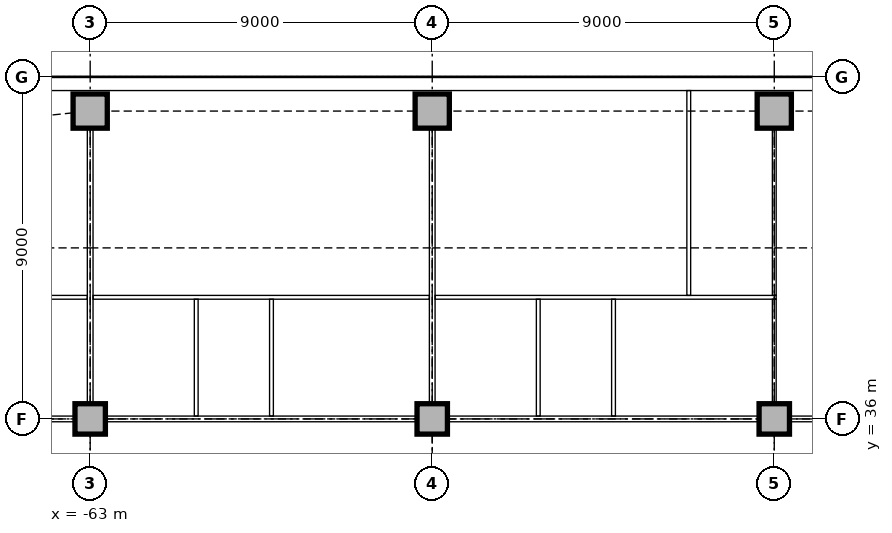
"""IFC4 building model, lengths in metres.
Left out: names, types, materials, properties, quantities, classifications, styles, units other than length and angle.
Written with IfcOpenShell. Run it as: python <this file> out.ifc"""

import sys

from ifc_helpers import new_model, si_unit, direction, frame, frame_2d, origin, origin_2d, place, context, subcontext, project, spatial, rectangle, extrude, element, fill, save


model = new_model("IFC4")
c1 = context("Model", 3, precision=1e-05, world=origin(), true_north=direction((0.0, 1.0)))
c2 = subcontext(c1, "Body", "Model", "MODEL_VIEW")
j1 = project(units=[si_unit("LENGTHUNIT", "METRE"), si_unit("PLANEANGLEUNIT", "RADIAN")], contexts=[c1])
p1 = place(None, origin())
s1 = spatial("IfcSite", under=j1, at=p1, CompositionType="ELEMENT")
p2 = place(p1, origin())
s2 = spatial("IfcBuilding", under=s1, at=p2, CompositionType="ELEMENT")
p3 = place(p2, frame((0.0, 0.0, 26.0)))
s3 = spatial("IfcBuildingStorey", under=s2, at=p3, CompositionType="ELEMENT", Elevation=26.0)
for number, where, z_axis, x_axis in (
    (1, (-63.0, 44.1, 0.0), (0.0, 0.0, 1.0), (1.0, 0.0, 0.0)),
    (2, (-54.0, 44.1, 0.0), (0.0, 0.0, 1.0), (1.0, 0.0, 0.0)),
    (3, (-45.0, 44.1, 0.0), (0.0, 0.0, 1.0), (1.0, 0.0, 0.0)),
):
    element("IfcColumn", number, at=place(p3, frame(where, z_axis=z_axis, x_axis=x_axis)), inside=s3, PredefinedType="COLUMN", context=c2, shape_type="SweptSolid", body=[
        extrude(rectangle(XDim=0.9, YDim=0.9, at=origin_2d()), origin(), (0.0, 0.0, 1.0), 3.85),
    ])
for number, where, z_axis, x_axis in (
    (4, (-63.0, 36.0, 0.0), (0.0, 0.0, 1.0), (1.0, 0.0, 0.0)),
    (5, (-54.0, 36.0, 0.0), (0.0, 0.0, 1.0), (1.0, 0.0, 0.0)),
    (6, (-45.0, 36.0, 0.0), (0.0, 0.0, 1.0), (1.0, 0.0, 0.0)),
):
    element("IfcColumn", number, at=place(p3, frame(where, z_axis=z_axis, x_axis=x_axis)), inside=s3, PredefinedType="COLUMN", context=c2, shape_type="SweptSolid", body=[
        extrude(rectangle(XDim=0.8, YDim=0.8, at=origin_2d()), origin(), (0.0, 0.0, 1.0), 3.85),
    ])
p4 = place(p3, frame((-31.243, 44.82, 0.0), z_axis=(0.0, 0.0, 1.0), x_axis=(-1.0, 0.0, 0.0)))
e7 = element("IfcWall", 7, at=p4, inside=s3, PredefinedType="STANDARD", context=c2, shape_type="SweptSolid", body=[
    extrude(rectangle(XDim=36.515, YDim=0.36, at=frame_2d((18.257, 0.0))), origin(), (0.0, 0.0, 1.0), 3.85),
])
p5 = place(p4, frame((3.107, 0.0, 0.9)))
e8 = element("IfcOpeningElement", 8, at=p5, cuts=e7, PredefinedType="OPENING", context=c2, shape_type="SweptSolid", body=[
    extrude(rectangle(XDim=3.3, YDim=1.6, at=frame_2d((1.65, 0.8))), frame((0.0, 0.19, 0.0), z_axis=(0.0, -1.0, 0.0), x_axis=(1.0, 0.0, 0.0)), (0.0, 0.0, 1.0), 0.38),
])
p6 = place(p4, frame((7.607, 0.0, 0.9)))
e9 = element("IfcOpeningElement", 9, at=p6, cuts=e7, PredefinedType="OPENING", context=c2, shape_type="SweptSolid", body=[
    extrude(rectangle(XDim=3.3, YDim=1.6, at=frame_2d((1.65, 0.8))), frame((0.0, 0.19, 0.0), z_axis=(0.0, -1.0, 0.0), x_axis=(1.0, 0.0, 0.0)), (0.0, 0.0, 1.0), 0.38),
])
p7 = place(p4, frame((12.107, 0.0, 0.9)))
e10 = element("IfcOpeningElement", 10, at=p7, cuts=e7, PredefinedType="OPENING", context=c2, shape_type="SweptSolid", body=[
    extrude(rectangle(XDim=3.3, YDim=1.6, at=frame_2d((1.65, 0.8))), frame((0.0, 0.19, 0.0), z_axis=(0.0, -1.0, 0.0), x_axis=(1.0, 0.0, 0.0)), (0.0, 0.0, 1.0), 0.38),
])
p8 = place(p4, frame((16.607, 0.0, 0.9)))
e11 = element("IfcOpeningElement", 11, at=p8, cuts=e7, PredefinedType="OPENING", context=c2, shape_type="SweptSolid", body=[
    extrude(rectangle(XDim=3.3, YDim=1.6, at=frame_2d((1.65, 0.8))), frame((0.0, 0.19, 0.0), z_axis=(0.0, -1.0, 0.0), x_axis=(1.0, 0.0, 0.0)), (0.0, 0.0, 1.0), 0.38),
])
p9 = place(p4, frame((21.107, 0.0, 0.9)))
e12 = element("IfcOpeningElement", 12, at=p9, cuts=e7, PredefinedType="OPENING", context=c2, shape_type="SweptSolid", body=[
    extrude(rectangle(XDim=3.3, YDim=1.6, at=frame_2d((1.65, 0.8))), frame((0.0, 0.19, 0.0), z_axis=(0.0, -1.0, 0.0), x_axis=(1.0, 0.0, 0.0)), (0.0, 0.0, 1.0), 0.38),
])
p10 = place(p4, frame((25.607, 0.0, 0.9)))
e13 = element("IfcOpeningElement", 13, at=p10, cuts=e7, PredefinedType="OPENING", context=c2, shape_type="SweptSolid", body=[
    extrude(rectangle(XDim=3.3, YDim=1.6, at=frame_2d((1.65, 0.8))), frame((0.0, 0.19, 0.0), z_axis=(0.0, -1.0, 0.0), x_axis=(1.0, 0.0, 0.0)), (0.0, 0.0, 1.0), 0.38),
])
p11 = place(p4, frame((30.107, 0.0, 0.9)))
e14 = element("IfcOpeningElement", 14, at=p11, cuts=e7, PredefinedType="OPENING", context=c2, shape_type="SweptSolid", body=[
    extrude(rectangle(XDim=3.3, YDim=1.6, at=frame_2d((1.65, 0.8))), frame((0.0, 0.19, 0.0), z_axis=(0.0, -1.0, 0.0), x_axis=(1.0, 0.0, 0.0)), (0.0, 0.0, 1.0), 0.38),
])
p12 = place(p3, frame((-44.6, 36.0, 0.0), z_axis=(0.0, 0.0, 1.0), x_axis=(1.0, 0.0, 0.0)))
e15 = element("IfcWall", 15, at=p12, inside=s3, PredefinedType="PARTITIONING", context=c2, shape_type="SweptSolid", body=[
    extrude(rectangle(XDim=1.875, YDim=0.15, at=frame_2d((0.938, 0.0))), origin(), (0.0, 0.0, 1.0), 3.602),
])
p13 = place(p12, frame((0.5, 0.0, 0.0)))
e16 = element("IfcOpeningElement", 16, at=p13, cuts=e15, PredefinedType="OPENING", context=c2, shape_type="SweptSolid", body=[
    extrude(rectangle(XDim=0.9, YDim=2.1, at=frame_2d((0.45, 1.05))), frame((0.0, 0.085, 0.0), z_axis=(0.0, -1.0, 0.0), x_axis=(1.0, 0.0, 0.0)), (0.0, 0.0, 1.0), 0.17),
])
p14 = place(p3, frame((-53.6, 36.0, 0.0), z_axis=(0.0, 0.0, 1.0), x_axis=(1.0, 0.0, 0.0)))
e17 = element("IfcWall", 17, at=p14, inside=s3, PredefinedType="PARTITIONING", context=c2, shape_type="SweptSolid", body=[
    extrude(rectangle(XDim=8.2, YDim=0.15, at=frame_2d((4.1, 0.0))), origin(), (0.0, 0.0, 1.0), 3.15),
])
p15 = place(p14, frame((2.89, 0.0, 0.0)))
e18 = element("IfcOpeningElement", 18, at=p15, cuts=e17, PredefinedType="OPENING", context=c2, shape_type="SweptSolid", body=[
    extrude(rectangle(XDim=1.0, YDim=2.1, at=frame_2d((0.5, 1.05))), frame((0.0, 0.085, 0.0), z_axis=(0.0, -1.0, 0.0), x_axis=(1.0, 0.0, 0.0)), (0.0, 0.0, 1.0), 0.17),
])
p16 = place(p3, frame((-62.6, 36.0, 0.0), z_axis=(0.0, 0.0, 1.0), x_axis=(1.0, 0.0, 0.0)))
e19 = element("IfcWall", 19, at=p16, inside=s3, PredefinedType="PARTITIONING", context=c2, shape_type="SweptSolid", body=[
    extrude(rectangle(XDim=8.2, YDim=0.15, at=frame_2d((4.1, 0.0))), origin(), (0.0, 0.0, 1.0), 3.15),
])
p17 = place(p16, frame((2.89, 0.0, 0.0)))
e20 = element("IfcOpeningElement", 20, at=p17, cuts=e19, PredefinedType="OPENING", context=c2, shape_type="SweptSolid", body=[
    extrude(rectangle(XDim=1.0, YDim=2.1, at=frame_2d((0.5, 1.05))), frame((0.0, 0.085, 0.0), z_axis=(0.0, -1.0, 0.0), x_axis=(1.0, 0.0, 0.0)), (0.0, 0.0, 1.0), 0.17),
])
p18 = place(p3, frame((-70.65, 36.0, 0.0), z_axis=(0.0, 0.0, 1.0), x_axis=(1.0, 0.0, 0.0)))
e21 = element("IfcWall", 21, at=p18, inside=s3, PredefinedType="PARTITIONING", context=c2, shape_type="SweptSolid", body=[
    extrude(rectangle(XDim=7.25, YDim=0.15, at=frame_2d((3.625, 0.0))), origin(), (0.0, 0.0, 1.0), 3.15),
])
p19 = place(p18, frame((2.138, 0.0, 0.0)))
e22 = element("IfcOpeningElement", 22, at=p19, cuts=e21, PredefinedType="OPENING", context=c2, shape_type="SweptSolid", body=[
    extrude(rectangle(XDim=1.0, YDim=2.1, at=frame_2d((0.5, 1.05))), frame((0.0, 0.085, 0.0), z_axis=(0.0, -1.0, 0.0), x_axis=(1.0, 0.0, 0.0)), (0.0, 0.0, 1.0), 0.17),
])
for number, where, z_axis, x_axis in (
    (23, (-63.0, 36.4, 0.0), (0.0, 0.0, 1.0), (0.0, 1.0, 0.0)),
    (24, (-54.0, 36.4, 0.0), (0.0, 0.0, 1.0), (0.0, 1.0, 0.0)),
):
    element("IfcWall", number, at=place(p3, frame(where, z_axis=z_axis, x_axis=x_axis)), inside=s3, PredefinedType="PARTITIONING", context=c2, shape_type="SweptSolid", body=[
        extrude(rectangle(XDim=7.25, YDim=0.15, at=frame_2d((3.625, 0.0))), origin(), (0.0, 0.0, 1.0), 3.158),
    ])
p20 = place(p3, frame((-53.925, 39.2, 0.0), z_axis=(0.0, 0.0, 1.0), x_axis=(1.0, 0.0, 0.0)))
e25 = element("IfcWall", 25, at=p20, inside=s3, PredefinedType="PARTITIONING", context=c2, shape_type="SweptSolid", body=[
    extrude(rectangle(XDim=8.975, YDim=0.1, at=frame_2d((4.487, 0.0))), origin(), (0.0, 0.0, 1.0), 3.85),
])
p21 = place(p20, frame((3.265, 0.0, 0.0)))
e26 = element("IfcOpeningElement", 26, at=p21, cuts=e25, PredefinedType="OPENING", context=c2, shape_type="SweptSolid", body=[
    extrude(rectangle(XDim=0.9, YDim=2.1, at=frame_2d((0.45, 1.05))), frame((0.0, 0.06, 0.0), z_axis=(0.0, -1.0, 0.0), x_axis=(1.0, 0.0, 0.0)), (0.0, 0.0, 1.0), 0.12),
])
p22 = place(p3, frame((-62.925, 39.2, 0.0), z_axis=(0.0, 0.0, 1.0), x_axis=(1.0, 0.0, 0.0)))
e27 = element("IfcWall", 27, at=p22, inside=s3, PredefinedType="PARTITIONING", context=c2, shape_type="SweptSolid", body=[
    extrude(rectangle(XDim=8.85, YDim=0.1, at=frame_2d((4.425, 0.0))), origin(), (0.0, 0.0, 1.0), 3.85),
])
p23 = place(p22, frame((3.265, 0.0, 0.0)))
e28 = element("IfcOpeningElement", 28, at=p23, cuts=e27, PredefinedType="OPENING", context=c2, shape_type="SweptSolid", body=[
    extrude(rectangle(XDim=0.9, YDim=2.1, at=frame_2d((0.45, 1.05))), frame((0.0, 0.06, 0.0), z_axis=(0.0, -1.0, 0.0), x_axis=(1.0, 0.0, 0.0)), (0.0, 0.0, 1.0), 0.12),
])
p24 = place(p3, frame((-71.64, 39.2, 0.0), z_axis=(0.0, 0.0, 1.0), x_axis=(1.0, 0.0, 0.0)))
e29 = element("IfcWall", 29, at=p24, inside=s3, PredefinedType="PARTITIONING", context=c2, shape_type="SweptSolid", body=[
    extrude(rectangle(XDim=8.565, YDim=0.1, at=frame_2d((4.282, 0.0))), origin(), (0.0, 0.0, 1.0), 3.85),
])
p25 = place(p24, frame((3.178, 0.0, 0.0)))
e30 = element("IfcOpeningElement", 30, at=p25, cuts=e29, PredefinedType="OPENING", context=c2, shape_type="SweptSolid", body=[
    extrude(rectangle(XDim=0.9, YDim=2.1, at=frame_2d((0.45, 1.05))), frame((0.0, 0.06, 0.0), z_axis=(0.0, -1.0, 0.0), x_axis=(1.0, 0.0, 0.0)), (0.0, 0.0, 1.0), 0.12),
])
p26 = place(p3, frame((-45.0, 39.25, 0.0), z_axis=(0.0, 0.0, 1.0), x_axis=(0.0, 1.0, 0.0)))
e31 = element("IfcWall", 31, at=p26, inside=s3, PredefinedType="PARTITIONING", context=c2, shape_type="SweptSolid", body=[
    extrude(rectangle(XDim=4.4, YDim=0.1, at=frame_2d((2.2, 0.0))), origin(), (0.0, 0.0, 1.0), 3.158),
])
p27 = place(p3, frame((-45.0, 36.4, 0.0), z_axis=(0.0, 0.0, 1.0), x_axis=(0.0, 1.0, 0.0)))
e32 = element("IfcWall", 32, at=p27, inside=s3, PredefinedType="PARTITIONING", context=c2, shape_type="SweptSolid", body=[
    extrude(rectangle(XDim=2.75, YDim=0.1, at=frame_2d((1.375, 0.0))), origin(), (0.0, 0.0, 1.0), 3.158),
])
p28 = place(p3, frame((-47.25, 39.25, 0.0), z_axis=(0.0, 0.0, 1.0), x_axis=(0.0, 1.0, 0.0)))
e33 = element("IfcWall", 33, at=p28, inside=s3, PredefinedType="PARTITIONING", context=c2, shape_type="SweptSolid", body=[
    extrude(rectangle(XDim=5.39, YDim=0.1, at=frame_2d((2.695, 0.0))), origin(), (0.0, 0.0, 1.0), 3.85),
])
p29 = place(p28, frame((2.25, 0.0, 0.0)))
e34 = element("IfcOpeningElement", 34, at=p29, cuts=e33, PredefinedType="OPENING", context=c2, shape_type="SweptSolid", body=[
    extrude(rectangle(XDim=0.9, YDim=2.1, at=frame_2d((0.45, 1.05))), frame((0.0, 0.06, 0.0), z_axis=(0.0, -1.0, 0.0), x_axis=(1.0, 0.0, 0.0)), (0.0, 0.0, 1.0), 0.12),
])
p30 = place(p3, frame((-60.21, 36.075, 0.0), z_axis=(0.0, 0.0, 1.0), x_axis=(0.0, 1.0, 0.0)))
e35 = element("IfcWall", 35, at=p30, inside=s3, PredefinedType="PARTITIONING", context=c2, shape_type="SweptSolid", body=[
    extrude(rectangle(XDim=3.075, YDim=0.1, at=frame_2d((1.538, 0.0))), origin(), (0.0, 0.0, 1.0), 3.85),
])
p31 = place(p30, frame((1.1, 0.0, 0.0)))
e36 = element("IfcOpeningElement", 36, at=p31, cuts=e35, PredefinedType="OPENING", context=c2, shape_type="SweptSolid", body=[
    extrude(rectangle(XDim=0.9, YDim=2.1, at=frame_2d((0.45, 1.05))), frame((0.0, 0.06, 0.0), z_axis=(0.0, -1.0, 0.0), x_axis=(1.0, 0.0, 0.0)), (0.0, 0.0, 1.0), 0.12),
])
p32 = place(p3, frame((-58.23, 36.075, 0.0), z_axis=(0.0, 0.0, 1.0), x_axis=(0.0, 1.0, 0.0)))
e37 = element("IfcWall", 37, at=p32, inside=s3, PredefinedType="PARTITIONING", context=c2, shape_type="SweptSolid", body=[
    extrude(rectangle(XDim=3.075, YDim=0.1, at=frame_2d((1.538, 0.0))), origin(), (0.0, 0.0, 1.0), 3.85),
])
p33 = place(p32, frame((1.1, 0.0, 0.0)))
e38 = element("IfcOpeningElement", 38, at=p33, cuts=e37, PredefinedType="OPENING", context=c2, shape_type="SweptSolid", body=[
    extrude(rectangle(XDim=0.9, YDim=2.1, at=frame_2d((0.45, 1.05))), frame((0.0, 0.06, 0.0), z_axis=(0.0, -1.0, 0.0), x_axis=(1.0, 0.0, 0.0)), (0.0, 0.0, 1.0), 0.12),
])
p34 = place(p3, frame((-51.21, 36.075, 0.0), z_axis=(0.0, 0.0, 1.0), x_axis=(0.0, 1.0, 0.0)))
e39 = element("IfcWall", 39, at=p34, inside=s3, PredefinedType="PARTITIONING", context=c2, shape_type="SweptSolid", body=[
    extrude(rectangle(XDim=3.075, YDim=0.1, at=frame_2d((1.538, 0.0))), origin(), (0.0, 0.0, 1.0), 3.85),
])
p35 = place(p34, frame((1.1, 0.0, 0.0)))
e40 = element("IfcOpeningElement", 40, at=p35, cuts=e39, PredefinedType="OPENING", context=c2, shape_type="SweptSolid", body=[
    extrude(rectangle(XDim=0.9, YDim=2.1, at=frame_2d((0.45, 1.05))), frame((0.0, 0.06, 0.0), z_axis=(0.0, -1.0, 0.0), x_axis=(1.0, 0.0, 0.0)), (0.0, 0.0, 1.0), 0.12),
])
p36 = place(p3, frame((-49.23, 36.075, 0.0), z_axis=(0.0, 0.0, 1.0), x_axis=(0.0, 1.0, 0.0)))
e41 = element("IfcWall", 41, at=p36, inside=s3, PredefinedType="PARTITIONING", context=c2, shape_type="SweptSolid", body=[
    extrude(rectangle(XDim=3.075, YDim=0.1, at=frame_2d((1.538, 0.0))), origin(), (0.0, 0.0, 1.0), 3.85),
])
p37 = place(p36, frame((1.1, 0.0, 0.0)))
e42 = element("IfcOpeningElement", 42, at=p37, cuts=e41, PredefinedType="OPENING", context=c2, shape_type="SweptSolid", body=[
    extrude(rectangle(XDim=0.9, YDim=2.1, at=frame_2d((0.45, 1.05))), frame((0.0, 0.06, 0.0), z_axis=(0.0, -1.0, 0.0), x_axis=(1.0, 0.0, 0.0)), (0.0, 0.0, 1.0), 0.12),
])
p38 = place(p7, origin())
e43 = element("IfcWindow", 43, at=p38, inside=s3, PartitioningType="SINGLE_PANEL", PredefinedType="WINDOW", context=c2, shape_type="SweptSolid", body=[
    extrude(rectangle(XDim=3.3, YDim=1.6, at=frame_2d((1.65, 0.8))), frame((0.0, 0.13, 0.0), z_axis=(0.0, -1.0, 0.0), x_axis=(1.0, 0.0, 0.0)), (0.0, 0.0, 1.0), 0.06),
])
fill(e10, e43)
p39 = place(p8, origin())
e44 = element("IfcWindow", 44, at=p39, inside=s3, PartitioningType="SINGLE_PANEL", PredefinedType="WINDOW", context=c2, shape_type="SweptSolid", body=[
    extrude(rectangle(XDim=3.3, YDim=1.6, at=frame_2d((1.65, 0.8))), frame((0.0, 0.13, 0.0), z_axis=(0.0, -1.0, 0.0), x_axis=(1.0, 0.0, 0.0)), (0.0, 0.0, 1.0), 0.06),
])
fill(e11, e44)
p40 = place(p9, origin())
e45 = element("IfcWindow", 45, at=p40, inside=s3, PartitioningType="SINGLE_PANEL", PredefinedType="WINDOW", context=c2, shape_type="SweptSolid", body=[
    extrude(rectangle(XDim=3.3, YDim=1.6, at=frame_2d((1.65, 0.8))), frame((0.0, 0.13, 0.0), z_axis=(0.0, -1.0, 0.0), x_axis=(1.0, 0.0, 0.0)), (0.0, 0.0, 1.0), 0.06),
])
fill(e12, e45)
p41 = place(p10, origin())
e46 = element("IfcWindow", 46, at=p41, inside=s3, PartitioningType="SINGLE_PANEL", PredefinedType="WINDOW", context=c2, shape_type="SweptSolid", body=[
    extrude(rectangle(XDim=3.3, YDim=1.6, at=frame_2d((1.65, 0.8))), frame((0.0, 0.13, 0.0), z_axis=(0.0, -1.0, 0.0), x_axis=(1.0, 0.0, 0.0)), (0.0, 0.0, 1.0), 0.06),
])
fill(e13, e46)
p42 = place(p11, origin())
e47 = element("IfcWindow", 47, at=p42, inside=s3, PartitioningType="SINGLE_PANEL", PredefinedType="WINDOW", context=c2, shape_type="SweptSolid", body=[
    extrude(rectangle(XDim=3.3, YDim=1.6, at=frame_2d((1.65, 0.8))), frame((0.0, 0.13, 0.0), z_axis=(0.0, -1.0, 0.0), x_axis=(1.0, 0.0, 0.0)), (0.0, 0.0, 1.0), 0.06),
])
fill(e14, e47)
p43 = place(p13, origin())
e48 = element("IfcDoor", 48, at=p43, inside=s3, OperationType="SINGLE_SWING_LEFT", PredefinedType="DOOR", context=c2, shape_type="SweptSolid", body=[
    extrude(rectangle(XDim=0.9, YDim=2.1, at=frame_2d((0.45, 1.05))), frame((0.0, 0.025, 0.0), z_axis=(0.0, -1.0, 0.0), x_axis=(1.0, 0.0, 0.0)), (0.0, 0.0, 1.0), 0.05),
])
fill(e16, e48)
p44 = place(p31, origin())
e49 = element("IfcDoor", 49, at=p44, inside=s3, OperationType="SINGLE_SWING_RIGHT", PredefinedType="DOOR", context=c2, shape_type="SweptSolid", body=[
    extrude(rectangle(XDim=0.9, YDim=2.1, at=frame_2d((0.45, 1.05))), frame((0.0, 0.025, 0.0), z_axis=(0.0, -1.0, 0.0), x_axis=(1.0, 0.0, 0.0)), (0.0, 0.0, 1.0), 0.05),
])
fill(e36, e49)
p45 = place(p33, origin())
e50 = element("IfcDoor", 50, at=p45, inside=s3, OperationType="SINGLE_SWING_LEFT", PredefinedType="DOOR", context=c2, shape_type="SweptSolid", body=[
    extrude(rectangle(XDim=0.9, YDim=2.1, at=frame_2d((0.45, 1.05))), frame((0.0, 0.025, 0.0), z_axis=(0.0, -1.0, 0.0), x_axis=(1.0, 0.0, 0.0)), (0.0, 0.0, 1.0), 0.05),
])
fill(e38, e50)
p46 = place(p23, frame((0.9, 0.0, 0.0), z_axis=(0.0, 0.0, 1.0), x_axis=(-1.0, 0.0, 0.0)))
e51 = element("IfcDoor", 51, at=p46, inside=s3, OperationType="SINGLE_SWING_LEFT", PredefinedType="DOOR", context=c2, shape_type="SweptSolid", body=[
    extrude(rectangle(XDim=0.9, YDim=2.1, at=frame_2d((0.45, 1.05))), frame((0.0, 0.025, 0.0), z_axis=(0.0, -1.0, 0.0), x_axis=(1.0, 0.0, 0.0)), (0.0, 0.0, 1.0), 0.05),
])
fill(e28, e51)
p47 = place(p17, origin())
e52 = element("IfcDoor", 52, at=p47, inside=s3, OperationType="SINGLE_SWING_RIGHT", PredefinedType="DOOR", context=c2, shape_type="SweptSolid", body=[
    extrude(rectangle(XDim=1.0, YDim=2.1, at=frame_2d((0.5, 1.05))), frame((0.0, 0.025, 0.0), z_axis=(0.0, -1.0, 0.0), x_axis=(1.0, 0.0, 0.0)), (0.0, 0.0, 1.0), 0.05),
])
fill(e20, e52)
p48 = place(p35, origin())
e53 = element("IfcDoor", 53, at=p48, inside=s3, OperationType="SINGLE_SWING_LEFT", PredefinedType="DOOR", context=c2, shape_type="SweptSolid", body=[
    extrude(rectangle(XDim=0.9, YDim=2.1, at=frame_2d((0.45, 1.05))), frame((0.0, 0.025, 0.0), z_axis=(0.0, -1.0, 0.0), x_axis=(1.0, 0.0, 0.0)), (0.0, 0.0, 1.0), 0.05),
])
fill(e40, e53)
p49 = place(p37, origin())
e54 = element("IfcDoor", 54, at=p49, inside=s3, OperationType="SINGLE_SWING_LEFT", PredefinedType="DOOR", context=c2, shape_type="SweptSolid", body=[
    extrude(rectangle(XDim=0.9, YDim=2.1, at=frame_2d((0.45, 1.05))), frame((0.0, 0.025, 0.0), z_axis=(0.0, -1.0, 0.0), x_axis=(1.0, 0.0, 0.0)), (0.0, 0.0, 1.0), 0.05),
])
fill(e42, e54)
p50 = place(p21, frame((0.9, 0.0, 0.0), z_axis=(0.0, 0.0, 1.0), x_axis=(-1.0, 0.0, 0.0)))
e55 = element("IfcDoor", 55, at=p50, inside=s3, OperationType="SINGLE_SWING_LEFT", PredefinedType="DOOR", context=c2, shape_type="SweptSolid", body=[
    extrude(rectangle(XDim=0.9, YDim=2.1, at=frame_2d((0.45, 1.05))), frame((0.0, 0.025, 0.0), z_axis=(0.0, -1.0, 0.0), x_axis=(1.0, 0.0, 0.0)), (0.0, 0.0, 1.0), 0.05),
])
fill(e26, e55)
p51 = place(p29, frame((0.9, 0.0, 0.0), z_axis=(0.0, 0.0, 1.0), x_axis=(-1.0, 0.0, 0.0)))
e56 = element("IfcDoor", 56, at=p51, inside=s3, OperationType="SINGLE_SWING_RIGHT", PredefinedType="DOOR", context=c2, shape_type="SweptSolid", body=[
    extrude(rectangle(XDim=0.9, YDim=2.1, at=frame_2d((0.45, 1.05))), frame((0.0, 0.025, 0.0), z_axis=(0.0, -1.0, 0.0), x_axis=(1.0, 0.0, 0.0)), (0.0, 0.0, 1.0), 0.05),
])
fill(e34, e56)
p52 = place(p15, origin())
e57 = element("IfcDoor", 57, at=p52, inside=s3, OperationType="SINGLE_SWING_RIGHT", PredefinedType="DOOR", context=c2, shape_type="SweptSolid", body=[
    extrude(rectangle(XDim=1.0, YDim=2.1, at=frame_2d((0.5, 1.05))), frame((0.0, 0.025, 0.0), z_axis=(0.0, -1.0, 0.0), x_axis=(1.0, 0.0, 0.0)), (0.0, 0.0, 1.0), 0.05),
])
fill(e18, e57)
save(model, sys.argv[1])
